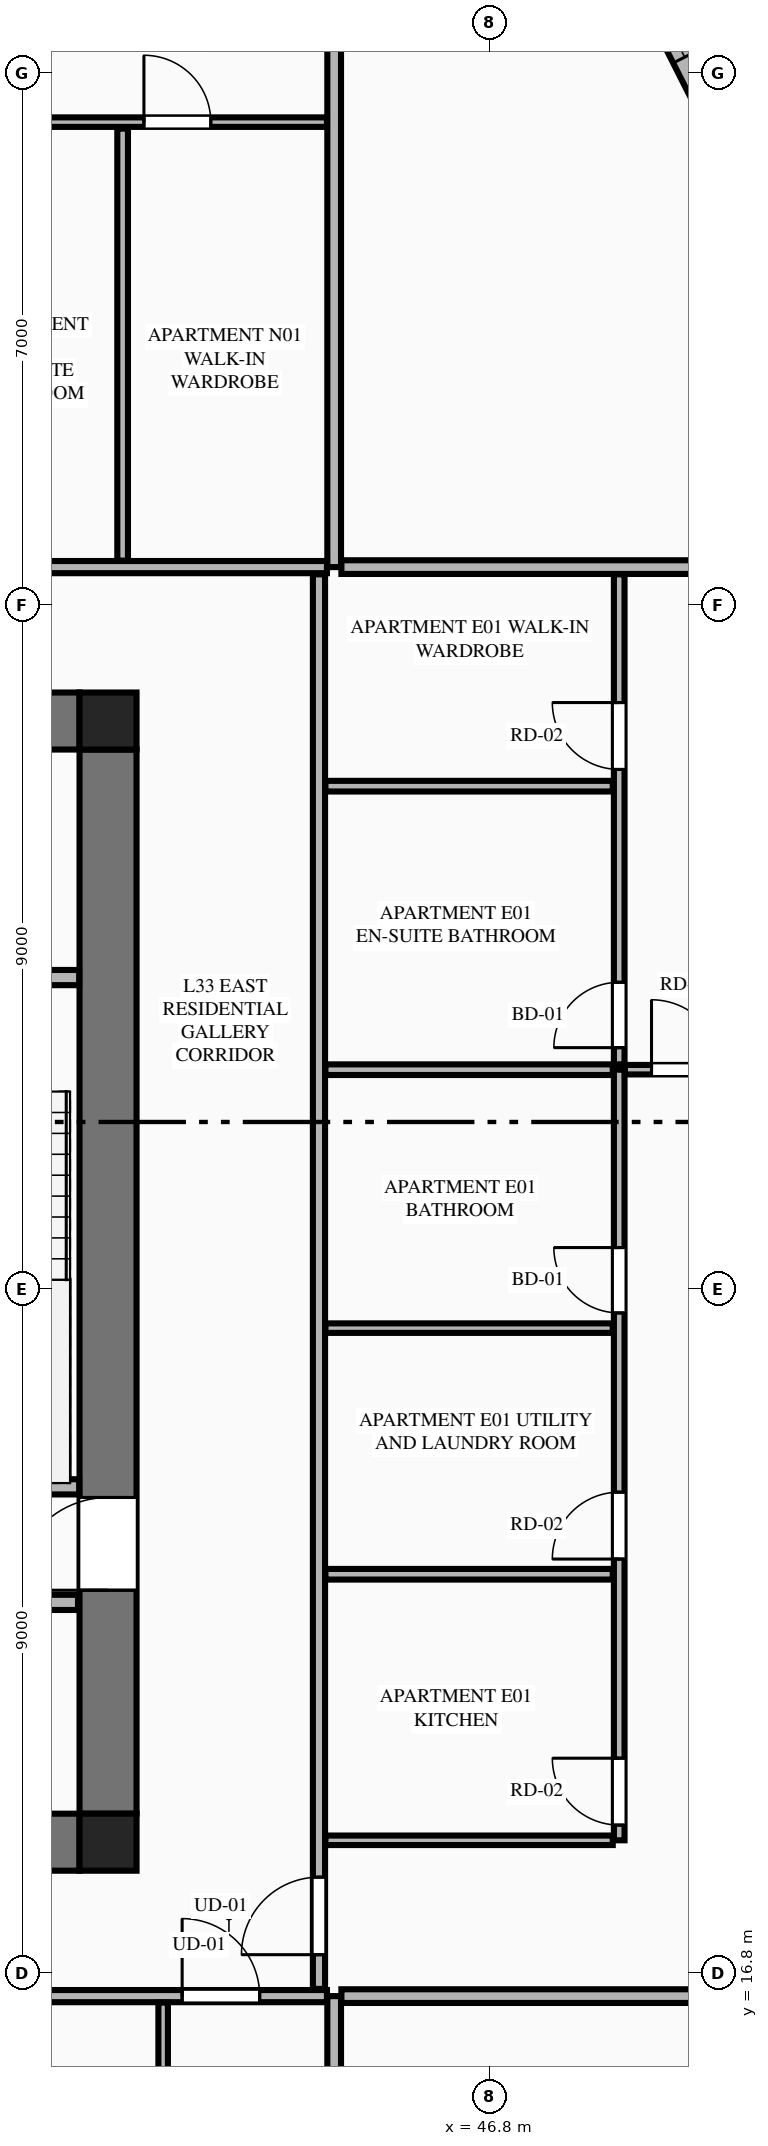
"""IFC4 building model, lengths in metres.
Left out: names, types, materials, properties, quantities, classifications, styles, units other than length and angle.
Written with IfcOpenShell. Run it as: python <this file> out.ifc"""

import sys

from ifc_helpers import new_model, si_unit, direction, frame, frame_2d, origin, origin_2d, place, context, subcontext, project, spatial, rectangle, extrude, element, fill, save


model = new_model("IFC4")
c1 = context("Model", 3, precision=1e-05, world=origin(), true_north=direction((0.0, 1.0)))
c2 = subcontext(c1, "Body", "Model", "MODEL_VIEW")
j1 = project(units=[si_unit("LENGTHUNIT", "METRE"), si_unit("PLANEANGLEUNIT", "RADIAN")], contexts=[c1])
p1 = place(None, origin())
s1 = spatial("IfcSite", under=j1, at=p1, CompositionType="ELEMENT")
p2 = place(p1, origin())
s2 = spatial("IfcBuilding", under=s1, at=p2, CompositionType="ELEMENT")
p3 = place(p2, frame((0.0, 0.0, 126.8)))
s3 = spatial("IfcBuildingStorey", under=s2, at=p3, CompositionType="ELEMENT", Elevation=126.8)
for number, where, z_axis, x_axis in (
    (1, (41.775, 18.525, 0.0), (0.0, 0.0, 1.0), (1.0, 0.0, 0.0)),
    (2, (41.775, 33.275, 0.0), (0.0, 0.0, 1.0), (1.0, 0.0, 0.0)),
):
    element("IfcColumn", number, at=place(p3, frame(where, z_axis=z_axis, x_axis=x_axis)), inside=s3, PredefinedType="COLUMN", context=c2, shape_type="SweptSolid", body=[
        extrude(rectangle(XDim=0.75, YDim=0.75, at=origin_2d()), origin(), (0.0, 0.0, 1.0), 3.55),
    ])
for number, where, z_axis, x_axis in (
    (3, (23.4, 18.525, 0.0), (0.0, 0.0, 1.0), (1.0, 0.0, 0.0)),
    (4, (23.4, 33.275, 0.0), (0.0, 0.0, 1.0), (1.0, 0.0, 0.0)),
):
    element("IfcWall", number, at=place(p3, frame(where, z_axis=z_axis, x_axis=x_axis)), inside=s3, PredefinedType="SHEAR", context=c2, shape_type="SweptSolid", body=[
        extrude(rectangle(XDim=18.0, YDim=0.75, at=frame_2d((9.0, 0.0))), origin(), (0.0, 0.0, 1.0), 3.34),
    ])
p4 = place(p3, frame((41.775, 18.9, 0.0), z_axis=(0.0, 0.0, 1.0), x_axis=(0.0, 1.0, 0.0)))
e5 = element("IfcWall", 5, at=p4, inside=s3, PredefinedType="SHEAR", context=c2, shape_type="SweptSolid", body=[
    extrude(rectangle(XDim=14.0, YDim=0.75, at=frame_2d((7.0, 0.0))), origin(), (0.0, 0.0, 1.0), 3.34),
])
p5 = place(p4, frame((2.94, 0.0, 0.0)))
e6 = element("IfcOpeningElement", 6, at=p5, cuts=e5, PredefinedType="OPENING", context=c2, shape_type="SweptSolid", body=[
    extrude(rectangle(XDim=1.22, YDim=2.25, at=frame_2d((0.61, 1.125))), frame((0.0, 0.385, 0.0), z_axis=(0.0, -1.0, 0.0), x_axis=(1.0, 0.0, 0.0)), (0.0, 0.0, 1.0), 0.77),
])
p6 = place(p3, frame((38.125, 23.2, 0.0), z_axis=(0.0, 0.0, 1.0), x_axis=(1.0, 0.0, 0.0)))
e7 = element("IfcWall", 7, at=p6, inside=s3, PredefinedType="PLUMBINGWALL", context=c2, shape_type="SweptSolid", body=[
    extrude(rectangle(XDim=3.27, YDim=0.2, at=frame_2d((1.635, 0.0))), origin(), (0.0, 0.0, 1.0), 3.34),
])
p7 = place(p3, frame((38.125, 29.9, 0.0), z_axis=(0.0, 0.0, 1.0), x_axis=(1.0, 0.0, 0.0)))
e8 = element("IfcWall", 8, at=p7, inside=s3, PredefinedType="PLUMBINGWALL", context=c2, shape_type="SweptSolid", body=[
    extrude(rectangle(XDim=3.27, YDim=0.2, at=frame_2d((1.635, 0.0))), origin(), (0.0, 0.0, 1.0), 3.34),
])
p8 = place(p7, frame((0.5, 0.0, 0.0)))
e9 = element("IfcOpeningElement", 9, at=p8, cuts=e8, PredefinedType="OPENING", context=c2, shape_type="SweptSolid", body=[
    extrude(rectangle(XDim=0.85, YDim=2.05, at=frame_2d((0.425, 1.025))), frame((0.0, 0.11, 0.0), z_axis=(0.0, -1.0, 0.0), x_axis=(1.0, 0.0, 0.0)), (0.0, 0.0, 1.0), 0.22),
])
p9 = place(p3, frame((23.42, 21.68, 0.0), z_axis=(0.0, 0.0, 1.0), x_axis=(1.0, 0.0, 0.0)))
e10 = element("IfcWall", 10, at=p9, inside=s3, PredefinedType="PLUMBINGWALL", context=c2, shape_type="SweptSolid", body=[
    extrude(rectangle(XDim=17.96, YDim=0.2, at=frame_2d((8.98, 0.0))), origin(), (0.0, 0.0, 1.0), 3.34),
])
p10 = place(p9, frame((11.6, 0.0, 0.0)))
e11 = element("IfcOpeningElement", 11, at=p10, cuts=e10, PredefinedType="OPENING", context=c2, shape_type="SweptSolid", body=[
    extrude(rectangle(XDim=1.1, YDim=2.2, at=frame_2d((0.55, 1.1))), frame((0.0, 0.11, 0.0), z_axis=(0.0, -1.0, 0.0), x_axis=(1.0, 0.0, 0.0)), (0.0, 0.0, 1.0), 0.22),
])
p11 = place(p9, frame((0.41, 0.0, 0.0)))
e12 = element("IfcOpeningElement", 12, at=p11, cuts=e10, PredefinedType="OPENING", context=c2, shape_type="SweptSolid", body=[
    extrude(rectangle(XDim=0.85, YDim=2.05, at=frame_2d((0.425, 1.025))), frame((0.0, 0.11, 0.0), z_axis=(0.0, -1.0, 0.0), x_axis=(1.0, 0.0, 0.0)), (0.0, 0.0, 1.0), 0.22),
])
p12 = place(p9, frame((6.03, 0.0, 0.0)))
e13 = element("IfcOpeningElement", 13, at=p12, cuts=e10, PredefinedType="OPENING", context=c2, shape_type="SweptSolid", body=[
    extrude(rectangle(XDim=0.85, YDim=2.05, at=frame_2d((0.425, 1.025))), frame((0.0, 0.11, 0.0), z_axis=(0.0, -1.0, 0.0), x_axis=(1.0, 0.0, 0.0)), (0.0, 0.0, 1.0), 0.22),
])
p13 = place(p9, frame((13.78, 0.0, 0.0)))
e14 = element("IfcOpeningElement", 14, at=p13, cuts=e10, PredefinedType="OPENING", context=c2, shape_type="SweptSolid", body=[
    extrude(rectangle(XDim=0.85, YDim=2.05, at=frame_2d((0.425, 1.025))), frame((0.0, 0.11, 0.0), z_axis=(0.0, -1.0, 0.0), x_axis=(1.0, 0.0, 0.0)), (0.0, 0.0, 1.0), 0.22),
])
p14 = place(p3, frame((50.251, 40.251, 0.0), z_axis=(0.0, 0.0, 1.0), x_axis=(-0.451548465867, 0.892246593142, 0.0)))
e15 = element("IfcWall", 15, at=p14, inside=s3, PredefinedType="STANDARD", context=c2, shape_type="SweptSolid", body=[
    extrude(rectangle(XDim=5.04, YDim=0.34, at=frame_2d((2.52, 0.0))), origin(), (0.0, 0.0, 1.0), 2.797),
])
p15 = place(p14, frame((1.97, 0.0, 0.75)))
e16 = element("IfcOpeningElement", 16, at=p15, cuts=e15, PredefinedType="OPENING", context=c2, shape_type="SweptSolid", body=[
    extrude(rectangle(XDim=1.1, YDim=1.897, at=frame_2d((0.55, 0.948))), frame((0.0, 0.18, 0.0), z_axis=(0.0, -1.0, 0.0), x_axis=(1.0, 0.0, 0.0)), (0.0, 0.0, 1.0), 0.36),
])
p16 = place(p3, frame((44.75, 4.105, 0.0), z_axis=(0.0, 0.0, 1.0), x_axis=(0.0, 1.0, 0.0)))
e17 = element("IfcWall", 17, at=p16, inside=s3, PredefinedType="PARTITIONING", context=c2, shape_type="SweptSolid", body=[
    extrude(rectangle(XDim=12.395, YDim=0.18, at=frame_2d((6.198, 0.0))), origin(), (0.0, 0.0, 1.0), 3.34),
])
p17 = place(p3, frame((28.663, 16.5, 0.0), z_axis=(0.0, 0.0, 1.0), x_axis=(1.0, 0.0, 0.0)))
e18 = element("IfcWall", 18, at=p17, inside=s3, PredefinedType="PARTITIONING", context=c2, shape_type="SweptSolid", body=[
    extrude(rectangle(XDim=15.992, YDim=0.16, at=frame_2d((7.996, 0.0))), origin(), (0.0, 0.0, 1.0), 3.34),
])
p18 = place(p17, frame((14.087, 0.0, 0.0)))
e19 = element("IfcOpeningElement", 19, at=p18, cuts=e18, PredefinedType="OPENING", context=c2, shape_type="SweptSolid", body=[
    extrude(rectangle(XDim=1.02, YDim=2.25, at=frame_2d((0.51, 1.125))), frame((0.0, 0.09, 0.0), z_axis=(0.0, -1.0, 0.0), x_axis=(1.0, 0.0, 0.0)), (0.0, 0.0, 1.0), 0.18),
])
p19 = place(p3, frame((42.5, 10.16, 0.0), z_axis=(0.0, 0.0, 1.0), x_axis=(0.0, 1.0, 0.0)))
e20 = element("IfcWall", 20, at=p19, inside=s3, PredefinedType="PARTITIONING", context=c2, shape_type="SweptSolid", body=[
    extrude(rectangle(XDim=6.255, YDim=0.125, at=frame_2d((3.127, 0.0))), origin(), (0.0, 0.0, 1.0), 2.722),
])
p20 = place(p3, frame((44.75, 35.3, 0.0), z_axis=(0.0, 0.0, 1.0), x_axis=(0.0, 1.0, 0.0)))
e21 = element("IfcWall", 21, at=p20, inside=s3, PredefinedType="PARTITIONING", context=c2, shape_type="SweptSolid", body=[
    extrude(rectangle(XDim=12.195, YDim=0.18, at=frame_2d((6.098, 0.0))), origin(), (0.0, 0.0, 1.0), 3.34),
])
p21 = place(p3, frame((20.145, 35.3, 0.0), z_axis=(0.0, 0.0, 1.0), x_axis=(1.0, 0.0, 0.0)))
e22 = element("IfcWall", 22, at=p21, inside=s3, PredefinedType="PARTITIONING", context=c2, shape_type="SweptSolid", body=[
    extrude(rectangle(XDim=24.51, YDim=0.16, at=frame_2d((12.255, 0.0))), origin(), (0.0, 0.0, 1.0), 3.34),
])
p22 = place(p21, frame((0.405, 0.0, 0.0)))
e23 = element("IfcOpeningElement", 23, at=p22, cuts=e22, PredefinedType="OPENING", context=c2, shape_type="SweptSolid", body=[
    extrude(rectangle(XDim=1.35, YDim=2.35, at=frame_2d((0.675, 1.175))), frame((0.0, 0.09, 0.0), z_axis=(0.0, -1.0, 0.0), x_axis=(1.0, 0.0, 0.0)), (0.0, 0.0, 1.0), 0.18),
])
p23 = place(p3, frame((34.643, 41.154, 0.0), z_axis=(0.0, 0.0, 1.0), x_axis=(1.0, 0.0, 0.0)))
e24 = element("IfcWall", 24, at=p23, inside=s3, PredefinedType="PARTITIONING", context=c2, shape_type="SweptSolid", body=[
    extrude(rectangle(XDim=10.012, YDim=0.125, at=frame_2d((5.006, 0.0))), origin(), (0.0, 0.0, 1.0), 3.34),
])
p24 = place(p23, frame((5.18, 0.0, 0.0)))
e25 = element("IfcOpeningElement", 25, at=p24, cuts=e24, PredefinedType="OPENING", context=c2, shape_type="SweptSolid", body=[
    extrude(rectangle(XDim=0.86, YDim=2.1, at=frame_2d((0.43, 1.05))), frame((0.0, 0.073, 0.0), z_axis=(0.0, -1.0, 0.0), x_axis=(1.0, 0.0, 0.0)), (0.0, 0.0, 1.0), 0.145),
])
p25 = place(p23, frame((7.604, 0.0, 0.0)))
e26 = element("IfcOpeningElement", 26, at=p25, cuts=e24, PredefinedType="OPENING", context=c2, shape_type="SweptSolid", body=[
    extrude(rectangle(XDim=0.88, YDim=2.15, at=frame_2d((0.44, 1.075))), frame((0.0, 0.073, 0.0), z_axis=(0.0, -1.0, 0.0), x_axis=(1.0, 0.0, 0.0)), (0.0, 0.0, 1.0), 0.145),
])
p26 = place(p23, frame((0.3, 0.0, 0.0)))
e27 = element("IfcOpeningElement", 27, at=p26, cuts=e24, PredefinedType="OPENING", context=c2, shape_type="SweptSolid", body=[
    extrude(rectangle(XDim=0.88, YDim=2.15, at=frame_2d((0.44, 1.075))), frame((0.0, 0.073, 0.0), z_axis=(0.0, -1.0, 0.0), x_axis=(1.0, 0.0, 0.0)), (0.0, 0.0, 1.0), 0.145),
])
p27 = place(p3, frame((41.967, 35.385, 0.0), z_axis=(0.0, 0.0, 1.0), x_axis=(0.0, 1.0, 0.0)))
e28 = element("IfcWall", 28, at=p27, inside=s3, PredefinedType="PLUMBINGWALL", context=c2, shape_type="SweptSolid", body=[
    extrude(rectangle(XDim=5.684, YDim=0.14, at=frame_2d((2.842, 0.0))), origin(), (0.0, 0.0, 1.0), 2.722),
])
p28 = place(p3, frame((44.845, 16.5, 0.0), z_axis=(0.0, 0.0, 1.0), x_axis=(1.0, 0.0, 0.0)))
e29 = element("IfcWall", 29, at=p28, inside=s3, PredefinedType="PARTITIONING", context=c2, shape_type="SweptSolid", body=[
    extrude(rectangle(XDim=7.77, YDim=0.18, at=frame_2d((3.885, 0.0))), origin(), (0.0, 0.0, 1.0), 3.34),
])
p29 = place(p3, frame((44.845, 35.3, 0.0), z_axis=(0.0, 0.0, 1.0), x_axis=(1.0, 0.0, 0.0)))
e30 = element("IfcWall", 30, at=p29, inside=s3, PredefinedType="PARTITIONING", context=c2, shape_type="SweptSolid", body=[
    extrude(rectangle(XDim=7.669, YDim=0.18, at=frame_2d((3.834, 0.0))), origin(), (0.0, 0.0, 1.0), 3.34),
])
p30 = place(p3, frame((44.55, 16.595, 0.0), z_axis=(0.0, 0.0, 1.0), x_axis=(0.0, 1.0, 0.0)))
e31 = element("IfcWall", 31, at=p30, inside=s3, PredefinedType="PARTITIONING", context=c2, shape_type="SweptSolid", body=[
    extrude(rectangle(XDim=18.61, YDim=0.16, at=frame_2d((9.305, 0.0))), origin(), (0.0, 0.0, 1.0), 3.34),
])
p31 = place(p30, frame((0.45, 0.0, 0.0)))
e32 = element("IfcOpeningElement", 32, at=p31, cuts=e31, PredefinedType="OPENING", context=c2, shape_type="SweptSolid", body=[
    extrude(rectangle(XDim=1.02, YDim=2.25, at=frame_2d((0.51, 1.125))), frame((0.0, 0.09, 0.0), z_axis=(0.0, -1.0, 0.0), x_axis=(1.0, 0.0, 0.0)), (0.0, 0.0, 1.0), 0.18),
])
p32 = place(p3, frame((44.635, 18.55, 0.0), z_axis=(0.0, 0.0, 1.0), x_axis=(1.0, 0.0, 0.0)))
e33 = element("IfcWall", 33, at=p32, inside=s3, PredefinedType="PARTITIONING", context=c2, shape_type="SweptSolid", body=[
    extrude(rectangle(XDim=3.78, YDim=0.125, at=frame_2d((1.89, 0.0))), origin(), (0.0, 0.0, 1.0), 2.722),
])
p33 = place(p3, frame((48.5, 18.55, 0.0), z_axis=(0.0, 0.0, 1.0), x_axis=(0.0, 1.0, 0.0)))
e34 = element("IfcWall", 34, at=p33, inside=s3, PredefinedType="PLUMBINGWALL", context=c2, shape_type="SweptSolid", body=[
    extrude(rectangle(XDim=10.138, YDim=0.14, at=frame_2d((5.069, 0.0))), origin(), (0.0, 0.0, 1.0), 3.34),
])
p34 = place(p33, frame((0.2, 0.0, 0.0)))
e35 = element("IfcOpeningElement", 35, at=p34, cuts=e34, PredefinedType="OPENING", context=c2, shape_type="SweptSolid", body=[
    extrude(rectangle(XDim=0.88, YDim=2.15, at=frame_2d((0.44, 1.075))), frame((0.0, 0.08, 0.0), z_axis=(0.0, -1.0, 0.0), x_axis=(1.0, 0.0, 0.0)), (0.0, 0.0, 1.0), 0.16),
])
p35 = place(p33, frame((3.7, 0.0, 0.0)))
e36 = element("IfcOpeningElement", 36, at=p35, cuts=e34, PredefinedType="OPENING", context=c2, shape_type="SweptSolid", body=[
    extrude(rectangle(XDim=0.88, YDim=2.15, at=frame_2d((0.44, 1.075))), frame((0.0, 0.08, 0.0), z_axis=(0.0, -1.0, 0.0), x_axis=(1.0, 0.0, 0.0)), (0.0, 0.0, 1.0), 0.16),
])
p36 = place(p33, frame((6.938, 0.0, 0.0)))
e37 = element("IfcOpeningElement", 37, at=p36, cuts=e34, PredefinedType="OPENING", context=c2, shape_type="SweptSolid", body=[
    extrude(rectangle(XDim=0.86, YDim=2.1, at=frame_2d((0.43, 1.05))), frame((0.0, 0.08, 0.0), z_axis=(0.0, -1.0, 0.0), x_axis=(1.0, 0.0, 0.0)), (0.0, 0.0, 1.0), 0.16),
])
p37 = place(p3, frame((48.5, 28.758, 0.0), z_axis=(0.0, 0.0, 1.0), x_axis=(0.0, 1.0, 0.0)))
e38 = element("IfcWall", 38, at=p37, inside=s3, PredefinedType="PLUMBINGWALL", context=c2, shape_type="SweptSolid", body=[
    extrude(rectangle(XDim=6.447, YDim=0.14, at=frame_2d((3.224, 0.0))), origin(), (0.0, 0.0, 1.0), 3.34),
])
p38 = place(p37, frame((0.22, 0.0, 0.0)))
e39 = element("IfcOpeningElement", 39, at=p38, cuts=e38, PredefinedType="OPENING", context=c2, shape_type="SweptSolid", body=[
    extrude(rectangle(XDim=0.86, YDim=2.1, at=frame_2d((0.43, 1.05))), frame((0.0, 0.08, 0.0), z_axis=(0.0, -1.0, 0.0), x_axis=(1.0, 0.0, 0.0)), (0.0, 0.0, 1.0), 0.16),
])
p39 = place(p37, frame((3.88, 0.0, 0.0)))
e40 = element("IfcOpeningElement", 40, at=p39, cuts=e38, PredefinedType="OPENING", context=c2, shape_type="SweptSolid", body=[
    extrude(rectangle(XDim=0.88, YDim=2.15, at=frame_2d((0.44, 1.075))), frame((0.0, 0.08, 0.0), z_axis=(0.0, -1.0, 0.0), x_axis=(1.0, 0.0, 0.0)), (0.0, 0.0, 1.0), 0.16),
])
p40 = place(p3, frame((44.635, 28.688, 0.0), z_axis=(0.0, 0.0, 1.0), x_axis=(1.0, 0.0, 0.0)))
e41 = element("IfcWall", 41, at=p40, inside=s3, PredefinedType="PLUMBINGWALL", context=c2, shape_type="SweptSolid", body=[
    extrude(rectangle(XDim=3.78, YDim=0.14, at=frame_2d((1.89, 0.0))), origin(), (0.0, 0.0, 1.0), 3.34),
])
p41 = place(p3, frame((48.575, 28.688, 0.0), z_axis=(0.0, 0.0, 1.0), x_axis=(1.0, 0.0, 0.0)))
e42 = element("IfcWall", 42, at=p41, inside=s3, PredefinedType="PARTITIONING", context=c2, shape_type="SweptSolid", body=[
    extrude(rectangle(XDim=7.3, YDim=0.125, at=frame_2d((3.65, 0.0))), origin(), (0.0, 0.0, 1.0), 3.34),
])
p42 = place(p41, frame((0.35, 0.0, 0.0)))
e43 = element("IfcOpeningElement", 43, at=p42, cuts=e42, PredefinedType="OPENING", context=c2, shape_type="SweptSolid", body=[
    extrude(rectangle(XDim=0.92, YDim=2.15, at=frame_2d((0.46, 1.075))), frame((0.0, 0.073, 0.0), z_axis=(0.0, -1.0, 0.0), x_axis=(1.0, 0.0, 0.0)), (0.0, 0.0, 1.0), 0.145),
])
p43 = place(p3, frame((44.635, 22.05, 0.0), z_axis=(0.0, 0.0, 1.0), x_axis=(1.0, 0.0, 0.0)))
e44 = element("IfcWall", 44, at=p43, inside=s3, PredefinedType="PLUMBINGWALL", context=c2, shape_type="SweptSolid", body=[
    extrude(rectangle(XDim=3.78, YDim=0.14, at=frame_2d((1.89, 0.0))), origin(), (0.0, 0.0, 1.0), 3.34),
])
p44 = place(p3, frame((44.635, 25.288, 0.0), z_axis=(0.0, 0.0, 1.0), x_axis=(1.0, 0.0, 0.0)))
e45 = element("IfcWall", 45, at=p44, inside=s3, PredefinedType="PARTITIONING", context=c2, shape_type="SweptSolid", body=[
    extrude(rectangle(XDim=3.78, YDim=0.125, at=frame_2d((1.89, 0.0))), origin(), (0.0, 0.0, 1.0), 3.34),
])
p45 = place(p3, frame((44.635, 32.418, 0.0), z_axis=(0.0, 0.0, 1.0), x_axis=(1.0, 0.0, 0.0)))
e46 = element("IfcWall", 46, at=p45, inside=s3, PredefinedType="PLUMBINGWALL", context=c2, shape_type="SweptSolid", body=[
    extrude(rectangle(XDim=3.78, YDim=0.14, at=frame_2d((1.89, 0.0))), origin(), (0.0, 0.0, 1.0), 3.34),
])
p46 = place(p5, origin())
e47 = element("IfcDoor", 47, at=p46, inside=s3, OperationType="SINGLE_SWING_LEFT", PredefinedType="DOOR", context=c2, shape_type="SweptSolid", body=[
    extrude(rectangle(XDim=1.22, YDim=2.25, at=frame_2d((0.61, 1.125))), frame((0.0, 0.025, 0.0), z_axis=(0.0, -1.0, 0.0), x_axis=(1.0, 0.0, 0.0)), (0.0, 0.0, 1.0), 0.05),
])
fill(e6, e47)
p47 = place(p15, origin())
e48 = element("IfcWindow", 48, at=p47, inside=s3, PartitioningType="SINGLE_PANEL", PredefinedType="WINDOW", context=c2, shape_type="SweptSolid", body=[
    extrude(rectangle(XDim=1.1, YDim=1.897, at=frame_2d((0.55, 0.948))), frame((0.0, 0.03, 0.0), z_axis=(0.0, -1.0, 0.0), x_axis=(1.0, 0.0, 0.0)), (0.0, 0.0, 1.0), 0.06),
])
fill(e16, e48)
p48 = place(p18, origin())
e49 = element("IfcDoor", 49, at=p48, inside=s3, OperationType="SINGLE_SWING_LEFT", PredefinedType="DOOR", context=c2, shape_type="SweptSolid", body=[
    extrude(rectangle(XDim=1.02, YDim=2.25, at=frame_2d((0.51, 1.125))), frame((0.0, 0.025, 0.0), z_axis=(0.0, -1.0, 0.0), x_axis=(1.0, 0.0, 0.0)), (0.0, 0.0, 1.0), 0.05),
])
fill(e19, e49)
p49 = place(p25, origin())
e50 = element("IfcDoor", 50, at=p49, inside=s3, OperationType="SINGLE_SWING_LEFT", PredefinedType="DOOR", context=c2, shape_type="SweptSolid", body=[
    extrude(rectangle(XDim=0.88, YDim=2.15, at=frame_2d((0.44, 1.075))), frame((0.0, 0.025, 0.0), z_axis=(0.0, -1.0, 0.0), x_axis=(1.0, 0.0, 0.0)), (0.0, 0.0, 1.0), 0.05),
])
fill(e26, e50)
p50 = place(p34, origin())
e51 = element("IfcDoor", 51, at=p50, inside=s3, OperationType="SINGLE_SWING_RIGHT", PredefinedType="DOOR", context=c2, shape_type="SweptSolid", body=[
    extrude(rectangle(XDim=0.88, YDim=2.15, at=frame_2d((0.44, 1.075))), frame((0.0, 0.025, 0.0), z_axis=(0.0, -1.0, 0.0), x_axis=(1.0, 0.0, 0.0)), (0.0, 0.0, 1.0), 0.05),
])
fill(e35, e51)
p51 = place(p35, origin())
e52 = element("IfcDoor", 52, at=p51, inside=s3, OperationType="SINGLE_SWING_LEFT", PredefinedType="DOOR", context=c2, shape_type="SweptSolid", body=[
    extrude(rectangle(XDim=0.88, YDim=2.15, at=frame_2d((0.44, 1.075))), frame((0.0, 0.025, 0.0), z_axis=(0.0, -1.0, 0.0), x_axis=(1.0, 0.0, 0.0)), (0.0, 0.0, 1.0), 0.05),
])
fill(e36, e52)
p52 = place(p36, origin())
e53 = element("IfcDoor", 53, at=p52, inside=s3, OperationType="SINGLE_SWING_RIGHT", PredefinedType="DOOR", context=c2, shape_type="SweptSolid", body=[
    extrude(rectangle(XDim=0.86, YDim=2.1, at=frame_2d((0.43, 1.05))), frame((0.0, 0.025, 0.0), z_axis=(0.0, -1.0, 0.0), x_axis=(1.0, 0.0, 0.0)), (0.0, 0.0, 1.0), 0.05),
])
fill(e37, e53)
p53 = place(p38, origin())
e54 = element("IfcDoor", 54, at=p53, inside=s3, OperationType="SINGLE_SWING_LEFT", PredefinedType="DOOR", context=c2, shape_type="SweptSolid", body=[
    extrude(rectangle(XDim=0.86, YDim=2.1, at=frame_2d((0.43, 1.05))), frame((0.0, 0.025, 0.0), z_axis=(0.0, -1.0, 0.0), x_axis=(1.0, 0.0, 0.0)), (0.0, 0.0, 1.0), 0.05),
])
fill(e39, e54)
p54 = place(p39, origin())
e55 = element("IfcDoor", 55, at=p54, inside=s3, OperationType="SINGLE_SWING_RIGHT", PredefinedType="DOOR", context=c2, shape_type="SweptSolid", body=[
    extrude(rectangle(XDim=0.88, YDim=2.15, at=frame_2d((0.44, 1.075))), frame((0.0, 0.025, 0.0), z_axis=(0.0, -1.0, 0.0), x_axis=(1.0, 0.0, 0.0)), (0.0, 0.0, 1.0), 0.05),
])
fill(e40, e55)
p55 = place(p31, origin())
e56 = element("IfcDoor", 56, at=p55, inside=s3, OperationType="SINGLE_SWING_LEFT", PredefinedType="DOOR", context=c2, shape_type="SweptSolid", body=[
    extrude(rectangle(XDim=1.02, YDim=2.25, at=frame_2d((0.51, 1.125))), frame((0.0, 0.025, 0.0), z_axis=(0.0, -1.0, 0.0), x_axis=(1.0, 0.0, 0.0)), (0.0, 0.0, 1.0), 0.05),
])
fill(e32, e56)
p56 = place(p42, origin())
e57 = element("IfcDoor", 57, at=p56, inside=s3, OperationType="SINGLE_SWING_LEFT", PredefinedType="DOOR", context=c2, shape_type="SweptSolid", body=[
    extrude(rectangle(XDim=0.92, YDim=2.15, at=frame_2d((0.46, 1.075))), frame((0.0, 0.025, 0.0), z_axis=(0.0, -1.0, 0.0), x_axis=(1.0, 0.0, 0.0)), (0.0, 0.0, 1.0), 0.05),
])
fill(e43, e57)
save(model, sys.argv[1])
